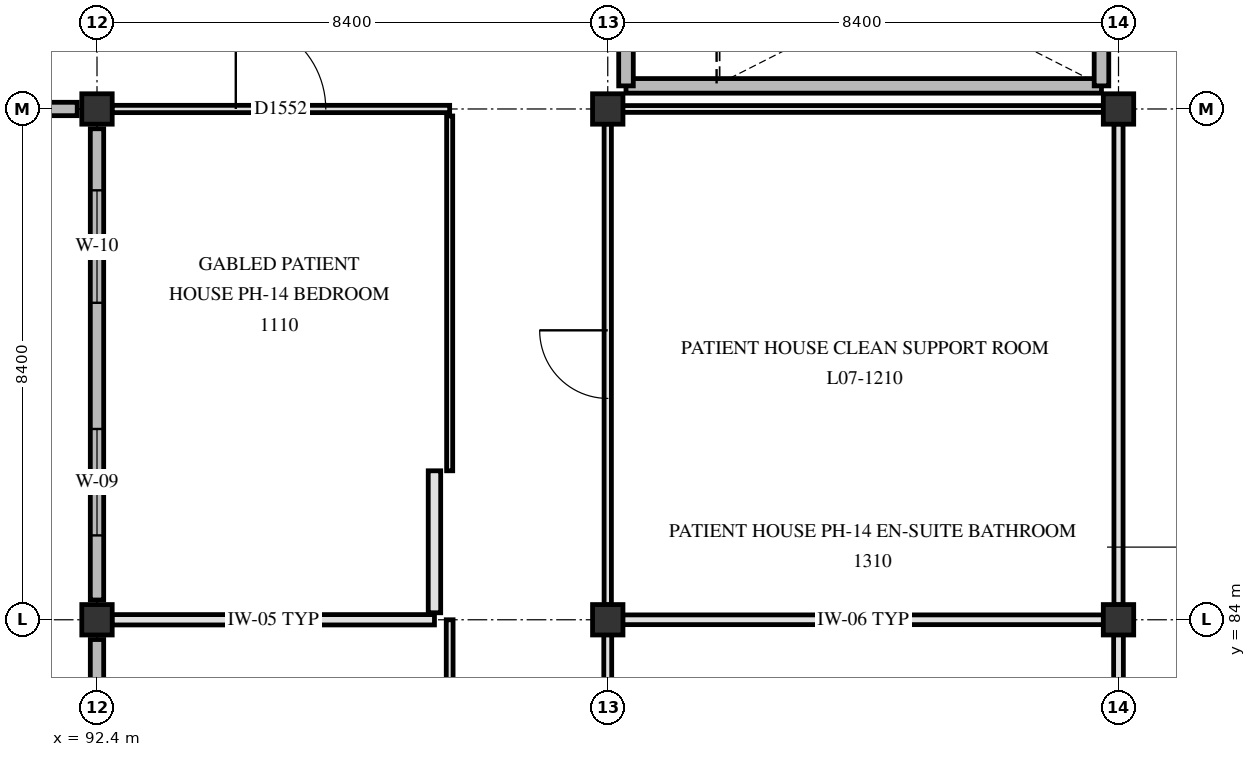
"""IFC4 building model, lengths in metres.
Left out: names, types, materials, properties, quantities, classifications, styles, units other than length and angle.
Written with IfcOpenShell. Run it as: python <this file> out.ifc"""

import sys

from ifc_helpers import new_model, si_unit, direction, frame, frame_2d, origin, origin_2d, place, context, subcontext, project, spatial, polyline, rectangle, outline, extrude, element, fill, save


model = new_model("IFC4")
c1 = context("Model", 3, precision=1e-05, world=origin(), true_north=direction((0.0, 1.0)))
c2 = subcontext(c1, "Body", "Model", "MODEL_VIEW")
j1 = project(units=[si_unit("LENGTHUNIT", "METRE"), si_unit("PLANEANGLEUNIT", "RADIAN")], contexts=[c1])
p1 = place(None, origin())
s1 = spatial("IfcSite", under=j1, at=p1, CompositionType="ELEMENT")
p2 = place(p1, origin())
s2 = spatial("IfcBuilding", under=s1, at=p2, CompositionType="ELEMENT")
p3 = place(p2, frame((0.0, 0.0, 30.3)))
s3 = spatial("IfcBuildingStorey", under=s2, at=p3, CompositionType="ELEMENT", Elevation=30.3)
for number, where, z_axis, x_axis in (
    (1, (92.4, 84.0, 0.0), (0.0, 0.0, 1.0), (1.0, 0.0, 0.0)),
    (2, (92.4, 92.4, 0.0), (0.0, 0.0, 1.0), (1.0, 0.0, 0.0)),
    (3, (100.8, 84.0, 0.0), (0.0, 0.0, 1.0), (1.0, 0.0, 0.0)),
    (4, (100.8, 92.4, 0.0), (0.0, 0.0, 1.0), (1.0, 0.0, 0.0)),
    (5, (109.2, 84.0, 0.0), (0.0, 0.0, 1.0), (1.0, 0.0, 0.0)),
    (6, (109.2, 92.4, 0.0), (0.0, 0.0, 1.0), (1.0, 0.0, 0.0)),
):
    element("IfcColumn", number, at=place(p3, frame(where, z_axis=z_axis, x_axis=x_axis)), inside=s3, PredefinedType="COLUMN", context=c2, shape_type="SweptSolid", body=[
        extrude(rectangle(XDim=0.5, YDim=0.5, at=origin_2d()), origin(), (0.0, 0.0, 1.0), 3.9),
    ])
p4 = place(p3, frame((92.4, 75.925, 0.0), z_axis=(0.0, 0.0, 1.0), x_axis=(0.0, 1.0, 0.0)))
e7 = element("IfcWall", 7, at=p4, inside=s3, PredefinedType="SOLIDWALL", context=c2, shape_type="SweptSolid", body=[
    extrude(outline(polyline([(0.0, 0.0), (7.75, 0.0), (7.75, 3.42), (3.875, 5.76), (0.0, 3.42), (0.0, 0.0)])), frame((0.0, 0.11, 0.0), z_axis=(0.0, -1.0, 0.0), x_axis=(1.0, 0.0, 0.0)), (0.0, 0.0, 1.0), 0.22),
])
p5 = place(p4, frame((1.163, 0.0, 0.85)))
e8 = element("IfcOpeningElement", 8, at=p5, cuts=e7, PredefinedType="OPENING", context=c2, shape_type="SweptSolid", body=[
    extrude(rectangle(XDim=1.55, YDim=1.3, at=frame_2d((0.775, 0.65))), frame((0.0, 0.12, 0.0), z_axis=(0.0, -1.0, 0.0), x_axis=(1.0, 0.0, 0.0)), (0.0, 0.0, 1.0), 0.24),
])
p6 = place(p4, frame((4.988, 0.0, 0.85)))
e9 = element("IfcOpeningElement", 9, at=p6, cuts=e7, PredefinedType="OPENING", context=c2, shape_type="SweptSolid", body=[
    extrude(rectangle(XDim=1.65, YDim=1.3, at=frame_2d((0.825, 0.65))), frame((0.0, 0.12, 0.0), z_axis=(0.0, -1.0, 0.0), x_axis=(1.0, 0.0, 0.0)), (0.0, 0.0, 1.0), 0.24),
])
p7 = place(p3, frame((92.4, 84.325, 0.0), z_axis=(0.0, 0.0, 1.0), x_axis=(0.0, 1.0, 0.0)))
e10 = element("IfcWall", 10, at=p7, inside=s3, PredefinedType="SOLIDWALL", context=c2, shape_type="SweptSolid", body=[
    extrude(outline(polyline([(0.0, 0.0), (7.75, 0.0), (7.75, 3.42), (3.875, 5.76), (0.0, 3.42), (0.0, 0.0)])), frame((0.0, 0.11, 0.0), z_axis=(0.0, -1.0, 0.0), x_axis=(1.0, 0.0, 0.0)), (0.0, 0.0, 1.0), 0.22),
])
p8 = place(p7, frame((1.062, 0.0, 0.85)))
e11 = element("IfcOpeningElement", 11, at=p8, cuts=e10, PredefinedType="OPENING", context=c2, shape_type="SweptSolid", body=[
    extrude(rectangle(XDim=1.75, YDim=1.3, at=frame_2d((0.875, 0.65))), frame((0.0, 0.12, 0.0), z_axis=(0.0, -1.0, 0.0), x_axis=(1.0, 0.0, 0.0)), (0.0, 0.0, 1.0), 0.24),
])
p9 = place(p7, frame((4.887, 0.0, 0.85)))
e12 = element("IfcOpeningElement", 12, at=p9, cuts=e10, PredefinedType="OPENING", context=c2, shape_type="SweptSolid", body=[
    extrude(rectangle(XDim=1.85, YDim=1.3, at=frame_2d((0.925, 0.65))), frame((0.0, 0.12, 0.0), z_axis=(0.0, -1.0, 0.0), x_axis=(1.0, 0.0, 0.0)), (0.0, 0.0, 1.0), 0.24),
])
p10 = place(p3, frame((92.075, 92.4, 0.0), z_axis=(0.0, 0.0, 1.0), x_axis=(-1.0, 0.0, 0.0)))
e13 = element("IfcWall", 13, at=p10, inside=s3, PredefinedType="SOLIDWALL", context=c2, shape_type="SweptSolid", body=[
    extrude(outline(polyline([(0.0, 0.0), (7.75, 0.0), (7.75, 3.4), (3.875, 5.76), (0.0, 3.4), (0.0, 0.0)])), frame((0.0, 0.11, 0.0), z_axis=(0.0, -1.0, 0.0), x_axis=(1.0, 0.0, 0.0)), (0.0, 0.0, 1.0), 0.22),
])
p11 = place(p10, frame((1.438, 0.0, 0.85)))
e14 = element("IfcOpeningElement", 14, at=p11, cuts=e13, PredefinedType="OPENING", context=c2, shape_type="SweptSolid", body=[
    extrude(rectangle(XDim=1.0, YDim=1.42, at=frame_2d((0.5, 0.71))), frame((0.0, 0.12, 0.0), z_axis=(0.0, -1.0, 0.0), x_axis=(1.0, 0.0, 0.0)), (0.0, 0.0, 1.0), 0.24),
])
p12 = place(p10, frame((5.262, 0.0, 0.85)))
e15 = element("IfcOpeningElement", 15, at=p12, cuts=e13, PredefinedType="OPENING", context=c2, shape_type="SweptSolid", body=[
    extrude(rectangle(XDim=1.1, YDim=1.42, at=frame_2d((0.55, 0.71))), frame((0.0, 0.12, 0.0), z_axis=(0.0, -1.0, 0.0), x_axis=(1.0, 0.0, 0.0)), (0.0, 0.0, 1.0), 0.24),
])
p13 = place(p3, frame((101.1, 92.78, 0.0), z_axis=(0.0, 0.0, 1.0), x_axis=(1.0, 0.0, 0.0)))
e16 = element("IfcWall", 16, at=p13, inside=s3, PredefinedType="SHEAR", context=c2, shape_type="SweptSolid", body=[
    extrude(rectangle(XDim=7.82, YDim=0.24, at=frame_2d((3.91, 0.0))), origin(), (0.0, 0.0, 1.0), 3.66),
])
for number, where, z_axis, x_axis in (
    (17, (101.1, 92.78, 0.0), (0.0, 0.0, 1.0), (0.0, 1.0, 0.0)),
    (18, (108.92, 92.78, 0.0), (0.0, 0.0, 1.0), (0.0, 1.0, 0.0)),
):
    element("IfcWall", number, at=place(p3, frame(where, z_axis=z_axis, x_axis=x_axis)), inside=s3, PredefinedType="SHEAR", context=c2, shape_type="SweptSolid", body=[
        extrude(rectangle(XDim=3.32, YDim=0.24, at=frame_2d((1.66, 0.0))), origin(), (0.0, 0.0, 1.0), 3.66),
    ])
p14 = place(p3, frame((92.645, 84.0, 0.0), z_axis=(0.0, 0.0, 1.0), x_axis=(1.0, 0.0, 0.0)))
e19 = element("IfcWall", 19, at=p14, inside=s3, PredefinedType="PARTITIONING", context=c2, shape_type="SweptSolid", body=[
    extrude(rectangle(XDim=5.305, YDim=0.17, at=frame_2d((2.652, 0.0))), origin(), (0.0, 0.0, 1.0), 3.25),
])
p15 = place(p3, frame((101.045, 84.0, 0.0), z_axis=(0.0, 0.0, 1.0), x_axis=(1.0, 0.0, 0.0)))
e20 = element("IfcWall", 20, at=p15, inside=s3, PredefinedType="PARTITIONING", context=c2, shape_type="SweptSolid", body=[
    extrude(rectangle(XDim=7.91, YDim=0.16, at=frame_2d((3.955, 0.0))), origin(), (0.0, 0.0, 1.0), 3.25),
])
p16 = place(p3, frame((92.645, 92.4, 0.0), z_axis=(0.0, 0.0, 1.0), x_axis=(1.0, 0.0, 0.0)))
e21 = element("IfcWall", 21, at=p16, inside=s3, PredefinedType="PARTITIONING", context=c2, shape_type="SweptSolid", body=[
    extrude(rectangle(XDim=5.555, YDim=0.12, at=frame_2d((2.777, 0.0))), origin(), (0.0, 0.0, 1.0), 3.25),
])
p17 = place(p16, frame((2.038, 0.0, 0.0)))
e22 = element("IfcOpeningElement", 22, at=p17, cuts=e21, PredefinedType="OPENING", context=c2, shape_type="SweptSolid", body=[
    extrude(rectangle(XDim=1.48, YDim=2.22, at=frame_2d((0.74, 1.11))), frame((0.0, 0.07, 0.0), z_axis=(0.0, -1.0, 0.0), x_axis=(1.0, 0.0, 0.0)), (0.0, 0.0, 1.0), 0.14),
])
p18 = place(p3, frame((101.045, 92.4, 0.0), z_axis=(0.0, 0.0, 1.0), x_axis=(1.0, 0.0, 0.0)))
e23 = element("IfcWall", 23, at=p18, inside=s3, PredefinedType="PARTITIONING", context=c2, shape_type="SweptSolid", body=[
    extrude(rectangle(XDim=7.91, YDim=0.112, at=frame_2d((3.955, 0.0))), origin(), (0.0, 0.0, 1.0), 3.25),
])
p19 = place(p3, frame((97.95, 84.115, 0.0), z_axis=(0.0, 0.0, 1.0), x_axis=(0.0, 1.0, 0.0)))
e24 = element("IfcWall", 24, at=p19, inside=s3, PredefinedType="PARTITIONING", context=c2, shape_type="SweptSolid", body=[
    extrude(rectangle(XDim=2.335, YDim=0.205, at=frame_2d((1.167, 0.0))), origin(), (0.0, 0.0, 1.0), 3.65),
])
p20 = place(p3, frame((98.2, 78.315, 0.0), z_axis=(0.0, 0.0, 1.0), x_axis=(0.0, 1.0, 0.0)))
e25 = element("IfcWall", 25, at=p20, inside=s3, PredefinedType="PARTITIONING", context=c2, shape_type="SweptSolid", body=[
    extrude(rectangle(XDim=5.685, YDim=0.112, at=frame_2d((2.843, 0.0))), origin(), (0.0, 0.0, 1.0), 3.25),
])
p21 = place(p3, frame((98.2, 86.45, 0.0), z_axis=(0.0, 0.0, 1.0), x_axis=(0.0, 1.0, 0.0)))
e26 = element("IfcWall", 26, at=p21, inside=s3, PredefinedType="PARTITIONING", context=c2, shape_type="SweptSolid", body=[
    extrude(rectangle(XDim=5.835, YDim=0.1, at=frame_2d((2.917, 0.0))), origin(), (0.0, 0.0, 1.0), 3.41),
])
p22 = place(p3, frame((100.8, 78.315, 0.0), z_axis=(0.0, 0.0, 1.0), x_axis=(0.0, 1.0, 0.0)))
e27 = element("IfcWall", 27, at=p22, inside=s3, PredefinedType="PARTITIONING", context=c2, shape_type="SweptSolid", body=[
    extrude(rectangle(XDim=5.44, YDim=0.13, at=frame_2d((2.72, 0.0))), origin(), (0.0, 0.0, 1.0), 3.25),
])
p23 = place(p3, frame((100.8, 84.245, 0.0), z_axis=(0.0, 0.0, 1.0), x_axis=(0.0, 1.0, 0.0)))
e28 = element("IfcWall", 28, at=p23, inside=s3, PredefinedType="PARTITIONING", context=c2, shape_type="SweptSolid", body=[
    extrude(rectangle(XDim=7.91, YDim=0.12, at=frame_2d((3.955, 0.0))), origin(), (0.0, 0.0, 1.0), 3.25),
])
p24 = place(p23, frame((3.395, 0.0, 0.0)))
e29 = element("IfcOpeningElement", 29, at=p24, cuts=e28, PredefinedType="OPENING", context=c2, shape_type="SweptSolid", body=[
    extrude(rectangle(XDim=1.12, YDim=2.18, at=frame_2d((0.56, 1.09))), frame((0.0, 0.07, 0.0), z_axis=(0.0, -1.0, 0.0), x_axis=(1.0, 0.0, 0.0)), (0.0, 0.0, 1.0), 0.14),
])
p25 = place(p3, frame((109.2, 78.315, 0.0), z_axis=(0.0, 0.0, 1.0), x_axis=(0.0, 1.0, 0.0)))
e30 = element("IfcWall", 30, at=p25, inside=s3, PredefinedType="PARTITIONING", context=c2, shape_type="SweptSolid", body=[
    extrude(rectangle(XDim=5.44, YDim=0.16, at=frame_2d((2.72, 0.0))), origin(), (0.0, 0.0, 1.0), 3.25),
])
p26 = place(p3, frame((109.2, 84.245, 0.0), z_axis=(0.0, 0.0, 1.0), x_axis=(0.0, 1.0, 0.0)))
e31 = element("IfcWall", 31, at=p26, inside=s3, PredefinedType="PARTITIONING", context=c2, shape_type="SweptSolid", body=[
    extrude(rectangle(XDim=7.91, YDim=0.15, at=frame_2d((3.955, 0.0))), origin(), (0.0, 0.0, 1.0), 3.25),
])
p27 = place(p8, origin())
e32 = element("IfcWindow", 32, at=p27, inside=s3, PartitioningType="SINGLE_PANEL", PredefinedType="WINDOW", context=c2, shape_type="SweptSolid", body=[
    extrude(rectangle(XDim=1.75, YDim=1.3, at=frame_2d((0.875, 0.65))), frame((0.0, 0.03, 0.0), z_axis=(0.0, -1.0, 0.0), x_axis=(1.0, 0.0, 0.0)), (0.0, 0.0, 1.0), 0.06),
])
fill(e11, e32)
p28 = place(p9, origin())
e33 = element("IfcWindow", 33, at=p28, inside=s3, PartitioningType="SINGLE_PANEL", PredefinedType="WINDOW", context=c2, shape_type="SweptSolid", body=[
    extrude(rectangle(XDim=1.85, YDim=1.3, at=frame_2d((0.925, 0.65))), frame((0.0, 0.03, 0.0), z_axis=(0.0, -1.0, 0.0), x_axis=(1.0, 0.0, 0.0)), (0.0, 0.0, 1.0), 0.06),
])
fill(e12, e33)
p29 = place(p17, origin())
e34 = element("IfcDoor", 34, at=p29, inside=s3, OperationType="SINGLE_SWING_LEFT", PredefinedType="DOOR", context=c2, shape_type="SweptSolid", body=[
    extrude(rectangle(XDim=1.48, YDim=2.22, at=frame_2d((0.74, 1.11))), frame((0.0, 0.025, 0.0), z_axis=(0.0, -1.0, 0.0), x_axis=(1.0, 0.0, 0.0)), (0.0, 0.0, 1.0), 0.05),
])
fill(e22, e34)
p30 = place(p24, origin())
e35 = element("IfcDoor", 35, at=p30, inside=s3, OperationType="SINGLE_SWING_RIGHT", PredefinedType="DOOR", context=c2, shape_type="SweptSolid", body=[
    extrude(rectangle(XDim=1.12, YDim=2.18, at=frame_2d((0.56, 1.09))), frame((0.0, 0.025, 0.0), z_axis=(0.0, -1.0, 0.0), x_axis=(1.0, 0.0, 0.0)), (0.0, 0.0, 1.0), 0.05),
])
fill(e29, e35)
save(model, sys.argv[1])
